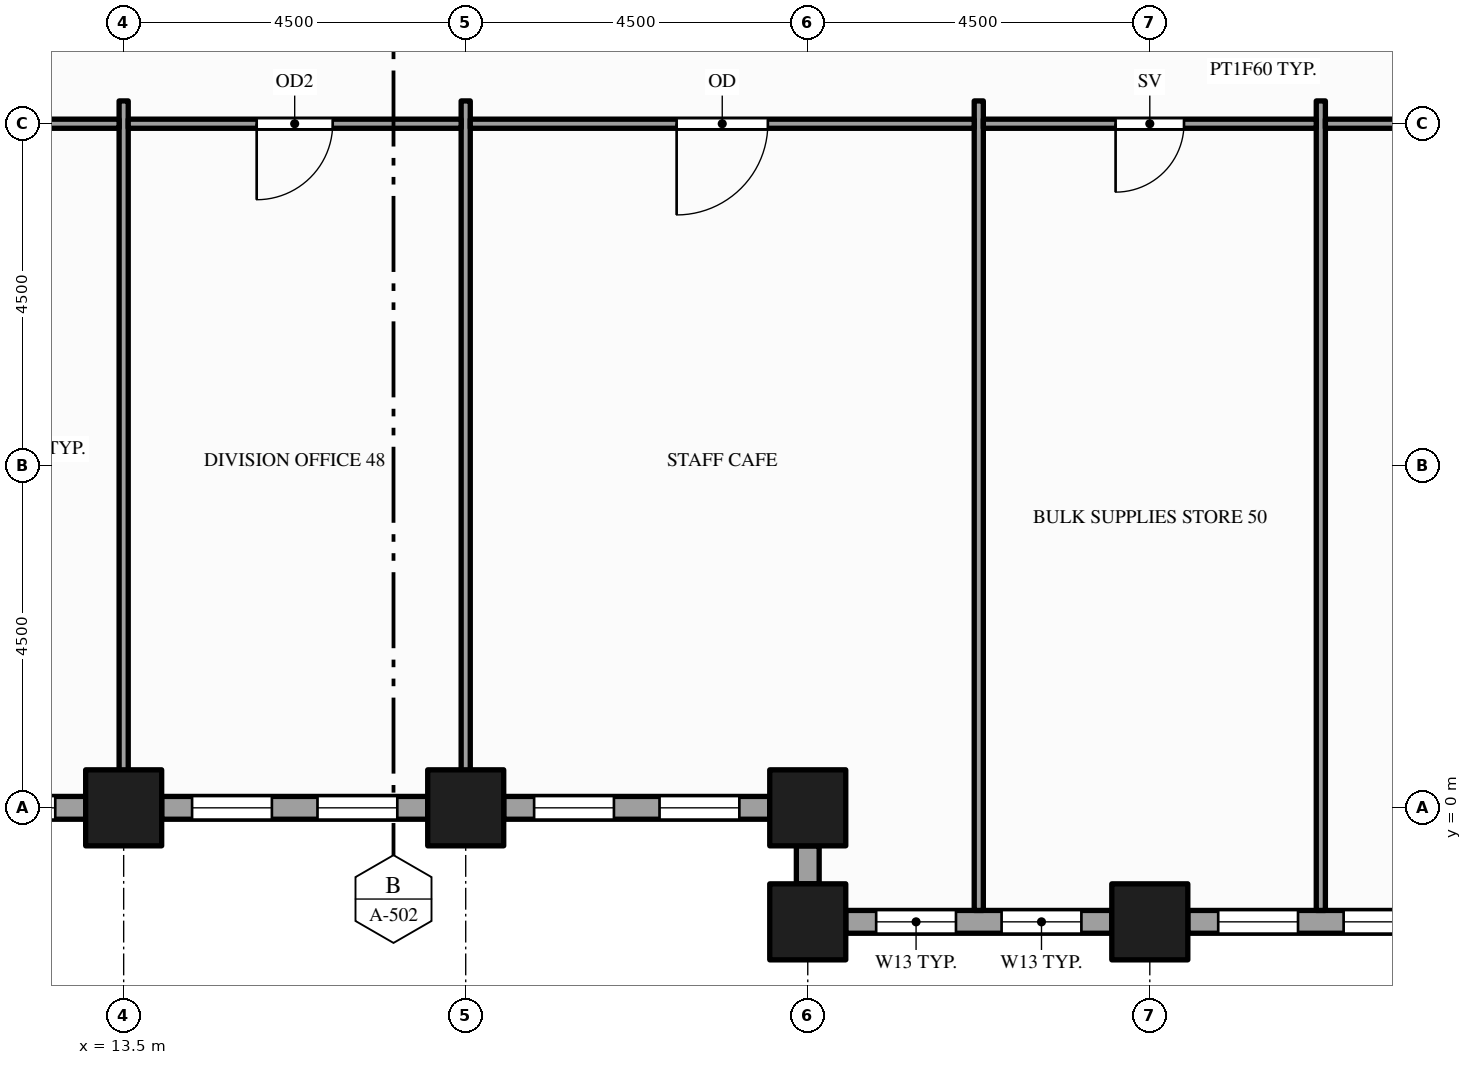
"""IFC4 building model, lengths in metres.
Left out: names, types, materials, properties, quantities, classifications, styles, units other than length and angle.
Written with IfcOpenShell. Run it as: python <this file> out.ifc"""

import sys

from ifc_helpers import new_model, si_unit, direction, frame, frame_2d, origin, origin_2d, place, context, subcontext, project, spatial, rectangle, hollow_rectangle, extrude, element, fill, save


model = new_model("IFC4")
c1 = context("Model", 3, precision=1e-05, world=origin(), true_north=direction((0.0, 1.0)))
c2 = subcontext(c1, "Body", "Model", "MODEL_VIEW")
j1 = project(units=[si_unit("LENGTHUNIT", "METRE"), si_unit("PLANEANGLEUNIT", "RADIAN")], contexts=[c1])
p1 = place(None, origin())
s1 = spatial("IfcSite", under=j1, at=p1, CompositionType="ELEMENT")
p2 = place(p1, origin())
s2 = spatial("IfcBuilding", under=s1, at=p2, CompositionType="ELEMENT")
p3 = place(p2, frame((0.0, 0.0, 115.0)))
s3 = spatial("IfcBuildingStorey", under=s2, at=p3, CompositionType="ELEMENT", Elevation=115.0)
for number, where, z_axis, x_axis in (
    (1, (13.5, 0.0, -0.15), (0.0, 0.0, 1.0), (1.0, 0.0, 0.0)),
    (2, (18.0, 0.0, -0.15), (0.0, 0.0, 1.0), (1.0, 0.0, 0.0)),
    (3, (22.5, -1.5, -0.15), (0.0, 0.0, 1.0), (1.0, 0.0, 0.0)),
    (4, (22.5, 0.0, -0.15), (0.0, 0.0, 1.0), (1.0, 0.0, 0.0)),
    (5, (27.0, -1.5, -0.15), (0.0, 0.0, 1.0), (1.0, 0.0, 0.0)),
):
    element("IfcColumn", number, at=place(p3, frame(where, z_axis=z_axis, x_axis=x_axis)), inside=s3, PredefinedType="COLUMN", context=c2, shape_type="SweptSolid", body=[
        extrude(hollow_rectangle(XDim=1.0, YDim=1.0, WallThickness=0.05, at=origin_2d()), origin(), (0.0, 0.0, 1.0), 4.0),
    ])
p4 = place(p3, frame((23.0, -1.5, 0.0), z_axis=(0.0, 0.0, 1.0), x_axis=(1.0, 0.0, 0.0)))
e6 = element("IfcWall", 6, at=p4, inside=s3, PredefinedType="STANDARD", context=c2, shape_type="SweptSolid", body=[
    extrude(rectangle(XDim=3.5, YDim=0.3, at=frame_2d((1.75, 0.0))), origin(), (0.0, 0.0, 1.0), 3.154),
])
p5 = place(p4, frame((0.4, 0.0, 0.9)))
e7 = element("IfcOpeningElement", 7, at=p5, cuts=e6, PredefinedType="OPENING", context=c2, shape_type="SweptSolid", body=[
    extrude(rectangle(XDim=1.05, YDim=2.0, at=frame_2d((0.525, 1.0))), frame((0.0, 0.16, 0.0), z_axis=(0.0, -1.0, 0.0), x_axis=(1.0, 0.0, 0.0)), (0.0, 0.0, 1.0), 0.32),
])
p6 = place(p4, frame((2.05, 0.0, 0.9)))
e8 = element("IfcOpeningElement", 8, at=p6, cuts=e6, PredefinedType="OPENING", context=c2, shape_type="SweptSolid", body=[
    extrude(rectangle(XDim=1.05, YDim=2.0, at=frame_2d((0.525, 1.0))), frame((0.0, 0.16, 0.0), z_axis=(0.0, -1.0, 0.0), x_axis=(1.0, 0.0, 0.0)), (0.0, 0.0, 1.0), 0.32),
])
p7 = place(p3, frame((27.5, -1.5, 0.0), z_axis=(0.0, 0.0, 1.0), x_axis=(1.0, 0.0, 0.0)))
e9 = element("IfcWall", 9, at=p7, inside=s3, PredefinedType="STANDARD", context=c2, shape_type="SweptSolid", body=[
    extrude(rectangle(XDim=3.5, YDim=0.3, at=frame_2d((1.75, 0.0))), origin(), (0.0, 0.0, 1.0), 3.154),
])
p8 = place(p7, frame((0.4, 0.0, 0.9)))
e10 = element("IfcOpeningElement", 10, at=p8, cuts=e9, PredefinedType="OPENING", context=c2, shape_type="SweptSolid", body=[
    extrude(rectangle(XDim=1.05, YDim=2.0, at=frame_2d((0.525, 1.0))), frame((0.0, 0.16, 0.0), z_axis=(0.0, -1.0, 0.0), x_axis=(1.0, 0.0, 0.0)), (0.0, 0.0, 1.0), 0.32),
])
p9 = place(p7, frame((2.05, 0.0, 0.9)))
e11 = element("IfcOpeningElement", 11, at=p9, cuts=e9, PredefinedType="OPENING", context=c2, shape_type="SweptSolid", body=[
    extrude(rectangle(XDim=1.05, YDim=2.0, at=frame_2d((0.525, 1.0))), frame((0.0, 0.16, 0.0), z_axis=(0.0, -1.0, 0.0), x_axis=(1.0, 0.0, 0.0)), (0.0, 0.0, 1.0), 0.32),
])
p10 = place(p3, frame((9.5, 0.0, 0.0), z_axis=(0.0, 0.0, 1.0), x_axis=(1.0, 0.0, 0.0)))
e12 = element("IfcWall", 12, at=p10, inside=s3, PredefinedType="STANDARD", context=c2, shape_type="SweptSolid", body=[
    extrude(rectangle(XDim=3.5, YDim=0.3, at=frame_2d((1.75, 0.0))), origin(), (0.0, 0.0, 1.0), 3.154),
])
p11 = place(p10, frame((0.4, 0.0, 0.9)))
e13 = element("IfcOpeningElement", 13, at=p11, cuts=e12, PredefinedType="OPENING", context=c2, shape_type="SweptSolid", body=[
    extrude(rectangle(XDim=1.05, YDim=2.0, at=frame_2d((0.525, 1.0))), frame((0.0, 0.16, 0.0), z_axis=(0.0, -1.0, 0.0), x_axis=(1.0, 0.0, 0.0)), (0.0, 0.0, 1.0), 0.32),
])
p12 = place(p10, frame((2.05, 0.0, 0.9)))
e14 = element("IfcOpeningElement", 14, at=p12, cuts=e12, PredefinedType="OPENING", context=c2, shape_type="SweptSolid", body=[
    extrude(rectangle(XDim=1.05, YDim=2.0, at=frame_2d((0.525, 1.0))), frame((0.0, 0.16, 0.0), z_axis=(0.0, -1.0, 0.0), x_axis=(1.0, 0.0, 0.0)), (0.0, 0.0, 1.0), 0.32),
])
p13 = place(p3, frame((14.0, 0.0, 0.0), z_axis=(0.0, 0.0, 1.0), x_axis=(1.0, 0.0, 0.0)))
e15 = element("IfcWall", 15, at=p13, inside=s3, PredefinedType="STANDARD", context=c2, shape_type="SweptSolid", body=[
    extrude(rectangle(XDim=3.5, YDim=0.3, at=frame_2d((1.75, 0.0))), origin(), (0.0, 0.0, 1.0), 3.154),
])
p14 = place(p13, frame((0.4, 0.0, 0.9)))
e16 = element("IfcOpeningElement", 16, at=p14, cuts=e15, PredefinedType="OPENING", context=c2, shape_type="SweptSolid", body=[
    extrude(rectangle(XDim=1.05, YDim=2.0, at=frame_2d((0.525, 1.0))), frame((0.0, 0.16, 0.0), z_axis=(0.0, -1.0, 0.0), x_axis=(1.0, 0.0, 0.0)), (0.0, 0.0, 1.0), 0.32),
])
p15 = place(p13, frame((2.05, 0.0, 0.9)))
e17 = element("IfcOpeningElement", 17, at=p15, cuts=e15, PredefinedType="OPENING", context=c2, shape_type="SweptSolid", body=[
    extrude(rectangle(XDim=1.05, YDim=2.0, at=frame_2d((0.525, 1.0))), frame((0.0, 0.16, 0.0), z_axis=(0.0, -1.0, 0.0), x_axis=(1.0, 0.0, 0.0)), (0.0, 0.0, 1.0), 0.32),
])
p16 = place(p3, frame((18.5, 0.0, 0.0), z_axis=(0.0, 0.0, 1.0), x_axis=(1.0, 0.0, 0.0)))
e18 = element("IfcWall", 18, at=p16, inside=s3, PredefinedType="STANDARD", context=c2, shape_type="SweptSolid", body=[
    extrude(rectangle(XDim=3.5, YDim=0.3, at=frame_2d((1.75, 0.0))), origin(), (0.0, 0.0, 1.0), 3.154),
])
p17 = place(p16, frame((0.4, 0.0, 0.9)))
e19 = element("IfcOpeningElement", 19, at=p17, cuts=e18, PredefinedType="OPENING", context=c2, shape_type="SweptSolid", body=[
    extrude(rectangle(XDim=1.05, YDim=2.0, at=frame_2d((0.525, 1.0))), frame((0.0, 0.16, 0.0), z_axis=(0.0, -1.0, 0.0), x_axis=(1.0, 0.0, 0.0)), (0.0, 0.0, 1.0), 0.32),
])
p18 = place(p16, frame((2.05, 0.0, 0.9)))
e20 = element("IfcOpeningElement", 20, at=p18, cuts=e18, PredefinedType="OPENING", context=c2, shape_type="SweptSolid", body=[
    extrude(rectangle(XDim=1.05, YDim=2.0, at=frame_2d((0.525, 1.0))), frame((0.0, 0.16, 0.0), z_axis=(0.0, -1.0, 0.0), x_axis=(1.0, 0.0, 0.0)), (0.0, 0.0, 1.0), 0.32),
])
p19 = place(p3, frame((22.5, -0.5, 0.0), z_axis=(0.0, 0.0, 1.0), x_axis=(0.0, -1.0, 0.0)))
e21 = element("IfcWall", 21, at=p19, inside=s3, PredefinedType="STANDARD", context=c2, shape_type="SweptSolid", body=[
    extrude(rectangle(XDim=0.5, YDim=0.3, at=frame_2d((0.25, 0.0))), origin(), (0.0, 0.0, 1.0), 3.154),
])
for number, where, z_axis, x_axis in (
    (22, (13.5, 0.15, 0.0), (0.0, 0.0, 1.0), (0.0, 1.0, 0.0)),
    (23, (18.0, 0.15, 0.0), (0.0, 0.0, 1.0), (0.0, 1.0, 0.0)),
):
    element("IfcWall", number, at=place(p3, frame(where, z_axis=z_axis, x_axis=x_axis)), inside=s3, PredefinedType="PARTITIONING", context=c2, shape_type="SweptSolid", body=[
        extrude(rectangle(XDim=9.15, YDim=0.12, at=frame_2d((4.575, 0.0))), origin(), (0.0, 0.0, 1.0), 2.938),
    ])
p20 = place(p3, frame((24.75, -1.35, 0.0), z_axis=(0.0, 0.0, 1.0), x_axis=(0.0, 1.0, 0.0)))
e24 = element("IfcWall", 24, at=p20, inside=s3, PredefinedType="PARTITIONING", context=c2, shape_type="SweptSolid", body=[
    extrude(rectangle(XDim=10.65, YDim=0.12, at=frame_2d((5.325, 0.0))), origin(), (0.0, 0.0, 1.0), 2.76),
])
p21 = place(p3, frame((29.25, -1.35, 0.0), z_axis=(0.0, 0.0, 1.0), x_axis=(0.0, 1.0, 0.0)))
e25 = element("IfcWall", 25, at=p21, inside=s3, PredefinedType="PARTITIONING", context=c2, shape_type="SweptSolid", body=[
    extrude(rectangle(XDim=10.65, YDim=0.12, at=frame_2d((5.325, 0.0))), origin(), (0.0, 0.0, 1.0), 2.938),
])
p22 = place(p3, frame((9.06, 9.0, 0.0), z_axis=(0.0, 0.0, 1.0), x_axis=(1.0, 0.0, 0.0)))
e26 = element("IfcWall", 26, at=p22, inside=s3, PredefinedType="PARTITIONING", context=c2, shape_type="SweptSolid", body=[
    extrude(rectangle(XDim=4.38, YDim=0.12, at=frame_2d((2.19, 0.0))), origin(), (0.0, 0.0, 1.0), 2.938),
])
p23 = place(p22, frame((1.69, 0.0, 0.0)))
e27 = element("IfcOpeningElement", 27, at=p23, cuts=e26, PredefinedType="OPENING", context=c2, shape_type="SweptSolid", body=[
    extrude(rectangle(XDim=1.0, YDim=2.1, at=frame_2d((0.5, 1.05))), frame((0.0, 0.07, 0.0), z_axis=(0.0, -1.0, 0.0), x_axis=(1.0, 0.0, 0.0)), (0.0, 0.0, 1.0), 0.14),
])
p24 = place(p3, frame((13.56, 9.0, 0.0), z_axis=(0.0, 0.0, 1.0), x_axis=(1.0, 0.0, 0.0)))
e28 = element("IfcWall", 28, at=p24, inside=s3, PredefinedType="PARTITIONING", context=c2, shape_type="SweptSolid", body=[
    extrude(rectangle(XDim=4.38, YDim=0.12, at=frame_2d((2.19, 0.0))), origin(), (0.0, 0.0, 1.0), 2.938),
])
p25 = place(p24, frame((1.69, 0.0, 0.0)))
e29 = element("IfcOpeningElement", 29, at=p25, cuts=e28, PredefinedType="OPENING", context=c2, shape_type="SweptSolid", body=[
    extrude(rectangle(XDim=1.0, YDim=2.1, at=frame_2d((0.5, 1.05))), frame((0.0, 0.07, 0.0), z_axis=(0.0, -1.0, 0.0), x_axis=(1.0, 0.0, 0.0)), (0.0, 0.0, 1.0), 0.14),
])
p26 = place(p3, frame((18.06, 9.0, 0.0), z_axis=(0.0, 0.0, 1.0), x_axis=(1.0, 0.0, 0.0)))
e30 = element("IfcWall", 30, at=p26, inside=s3, PredefinedType="PARTITIONING", context=c2, shape_type="SweptSolid", body=[
    extrude(rectangle(XDim=6.63, YDim=0.12, at=frame_2d((3.315, 0.0))), origin(), (0.0, 0.0, 1.0), 2.76),
])
p27 = place(p26, frame((2.715, 0.0, 0.0)))
e31 = element("IfcOpeningElement", 31, at=p27, cuts=e30, PredefinedType="OPENING", context=c2, shape_type="SweptSolid", body=[
    extrude(rectangle(XDim=1.2, YDim=2.1, at=frame_2d((0.6, 1.05))), frame((0.0, 0.07, 0.0), z_axis=(0.0, -1.0, 0.0), x_axis=(1.0, 0.0, 0.0)), (0.0, 0.0, 1.0), 0.14),
])
p28 = place(p3, frame((24.81, 9.0, 0.0), z_axis=(0.0, 0.0, 1.0), x_axis=(1.0, 0.0, 0.0)))
e32 = element("IfcWall", 32, at=p28, inside=s3, PredefinedType="PARTITIONING", context=c2, shape_type="SweptSolid", body=[
    extrude(rectangle(XDim=4.38, YDim=0.12, at=frame_2d((2.19, 0.0))), origin(), (0.0, 0.0, 1.0), 2.76),
])
p29 = place(p28, frame((1.74, 0.0, 0.0)))
e33 = element("IfcOpeningElement", 33, at=p29, cuts=e32, PredefinedType="OPENING", context=c2, shape_type="SweptSolid", body=[
    extrude(rectangle(XDim=0.9, YDim=2.1, at=frame_2d((0.45, 1.05))), frame((0.0, 0.07, 0.0), z_axis=(0.0, -1.0, 0.0), x_axis=(1.0, 0.0, 0.0)), (0.0, 0.0, 1.0), 0.14),
])
p30 = place(p3, frame((29.31, 9.0, 0.0), z_axis=(0.0, 0.0, 1.0), x_axis=(1.0, 0.0, 0.0)))
e34 = element("IfcWall", 34, at=p30, inside=s3, PredefinedType="PARTITIONING", context=c2, shape_type="SweptSolid", body=[
    extrude(rectangle(XDim=6.63, YDim=0.12, at=frame_2d((3.315, 0.0))), origin(), (0.0, 0.0, 1.0), 2.938),
])
p31 = place(p30, frame((2.815, 0.0, 0.0)))
e35 = element("IfcOpeningElement", 35, at=p31, cuts=e34, PredefinedType="OPENING", context=c2, shape_type="SweptSolid", body=[
    extrude(rectangle(XDim=1.0, YDim=2.1, at=frame_2d((0.5, 1.05))), frame((0.0, 0.07, 0.0), z_axis=(0.0, -1.0, 0.0), x_axis=(1.0, 0.0, 0.0)), (0.0, 0.0, 1.0), 0.14),
])
p32 = place(p5, origin())
e36 = element("IfcWindow", 36, at=p32, inside=s3, PartitioningType="SINGLE_PANEL", PredefinedType="WINDOW", context=c2, shape_type="SweptSolid", body=[
    extrude(rectangle(XDim=1.05, YDim=2.0, at=frame_2d((0.525, 1.0))), frame((0.0, 0.03, 0.0), z_axis=(0.0, -1.0, 0.0), x_axis=(1.0, 0.0, 0.0)), (0.0, 0.0, 1.0), 0.06),
])
fill(e7, e36)
p33 = place(p6, origin())
e37 = element("IfcWindow", 37, at=p33, inside=s3, PartitioningType="SINGLE_PANEL", PredefinedType="WINDOW", context=c2, shape_type="SweptSolid", body=[
    extrude(rectangle(XDim=1.05, YDim=2.0, at=frame_2d((0.525, 1.0))), frame((0.0, 0.03, 0.0), z_axis=(0.0, -1.0, 0.0), x_axis=(1.0, 0.0, 0.0)), (0.0, 0.0, 1.0), 0.06),
])
fill(e8, e37)
p34 = place(p8, origin())
e38 = element("IfcWindow", 38, at=p34, inside=s3, PartitioningType="SINGLE_PANEL", PredefinedType="WINDOW", context=c2, shape_type="SweptSolid", body=[
    extrude(rectangle(XDim=1.05, YDim=2.0, at=frame_2d((0.525, 1.0))), frame((0.0, 0.03, 0.0), z_axis=(0.0, -1.0, 0.0), x_axis=(1.0, 0.0, 0.0)), (0.0, 0.0, 1.0), 0.06),
])
fill(e10, e38)
p35 = place(p9, origin())
e39 = element("IfcWindow", 39, at=p35, inside=s3, PartitioningType="SINGLE_PANEL", PredefinedType="WINDOW", context=c2, shape_type="SweptSolid", body=[
    extrude(rectangle(XDim=1.05, YDim=2.0, at=frame_2d((0.525, 1.0))), frame((0.0, 0.03, 0.0), z_axis=(0.0, -1.0, 0.0), x_axis=(1.0, 0.0, 0.0)), (0.0, 0.0, 1.0), 0.06),
])
fill(e11, e39)
p36 = place(p12, origin())
e40 = element("IfcWindow", 40, at=p36, inside=s3, PartitioningType="SINGLE_PANEL", PredefinedType="WINDOW", context=c2, shape_type="SweptSolid", body=[
    extrude(rectangle(XDim=1.05, YDim=2.0, at=frame_2d((0.525, 1.0))), frame((0.0, 0.03, 0.0), z_axis=(0.0, -1.0, 0.0), x_axis=(1.0, 0.0, 0.0)), (0.0, 0.0, 1.0), 0.06),
])
fill(e14, e40)
p37 = place(p14, origin())
e41 = element("IfcWindow", 41, at=p37, inside=s3, PartitioningType="SINGLE_PANEL", PredefinedType="WINDOW", context=c2, shape_type="SweptSolid", body=[
    extrude(rectangle(XDim=1.05, YDim=2.0, at=frame_2d((0.525, 1.0))), frame((0.0, 0.03, 0.0), z_axis=(0.0, -1.0, 0.0), x_axis=(1.0, 0.0, 0.0)), (0.0, 0.0, 1.0), 0.06),
])
fill(e16, e41)
p38 = place(p15, origin())
e42 = element("IfcWindow", 42, at=p38, inside=s3, PartitioningType="SINGLE_PANEL", PredefinedType="WINDOW", context=c2, shape_type="SweptSolid", body=[
    extrude(rectangle(XDim=1.05, YDim=2.0, at=frame_2d((0.525, 1.0))), frame((0.0, 0.03, 0.0), z_axis=(0.0, -1.0, 0.0), x_axis=(1.0, 0.0, 0.0)), (0.0, 0.0, 1.0), 0.06),
])
fill(e17, e42)
p39 = place(p17, origin())
e43 = element("IfcWindow", 43, at=p39, inside=s3, PartitioningType="SINGLE_PANEL", PredefinedType="WINDOW", context=c2, shape_type="SweptSolid", body=[
    extrude(rectangle(XDim=1.05, YDim=2.0, at=frame_2d((0.525, 1.0))), frame((0.0, 0.03, 0.0), z_axis=(0.0, -1.0, 0.0), x_axis=(1.0, 0.0, 0.0)), (0.0, 0.0, 1.0), 0.06),
])
fill(e19, e43)
p40 = place(p18, origin())
e44 = element("IfcWindow", 44, at=p40, inside=s3, PartitioningType="SINGLE_PANEL", PredefinedType="WINDOW", context=c2, shape_type="SweptSolid", body=[
    extrude(rectangle(XDim=1.05, YDim=2.0, at=frame_2d((0.525, 1.0))), frame((0.0, 0.03, 0.0), z_axis=(0.0, -1.0, 0.0), x_axis=(1.0, 0.0, 0.0)), (0.0, 0.0, 1.0), 0.06),
])
fill(e20, e44)
p41 = place(p25, origin())
e45 = element("IfcDoor", 45, at=p41, inside=s3, OperationType="SINGLE_SWING_LEFT", PredefinedType="DOOR", context=c2, shape_type="SweptSolid", body=[
    extrude(rectangle(XDim=1.0, YDim=2.1, at=frame_2d((0.5, 1.05))), frame((0.0, 0.025, 0.0), z_axis=(0.0, -1.0, 0.0), x_axis=(1.0, 0.0, 0.0)), (0.0, 0.0, 1.0), 0.05),
])
fill(e29, e45)
p42 = place(p27, origin())
e46 = element("IfcDoor", 46, at=p42, inside=s3, OperationType="SINGLE_SWING_LEFT", PredefinedType="DOOR", context=c2, shape_type="SweptSolid", body=[
    extrude(rectangle(XDim=1.2, YDim=2.1, at=frame_2d((0.6, 1.05))), frame((0.0, 0.025, 0.0), z_axis=(0.0, -1.0, 0.0), x_axis=(1.0, 0.0, 0.0)), (0.0, 0.0, 1.0), 0.05),
])
fill(e31, e46)
p43 = place(p29, origin())
e47 = element("IfcDoor", 47, at=p43, inside=s3, OperationType="SINGLE_SWING_LEFT", PredefinedType="DOOR", context=c2, shape_type="SweptSolid", body=[
    extrude(rectangle(XDim=0.9, YDim=2.1, at=frame_2d((0.45, 1.05))), frame((0.0, 0.025, 0.0), z_axis=(0.0, -1.0, 0.0), x_axis=(1.0, 0.0, 0.0)), (0.0, 0.0, 1.0), 0.05),
])
fill(e33, e47)
save(model, sys.argv[1])
